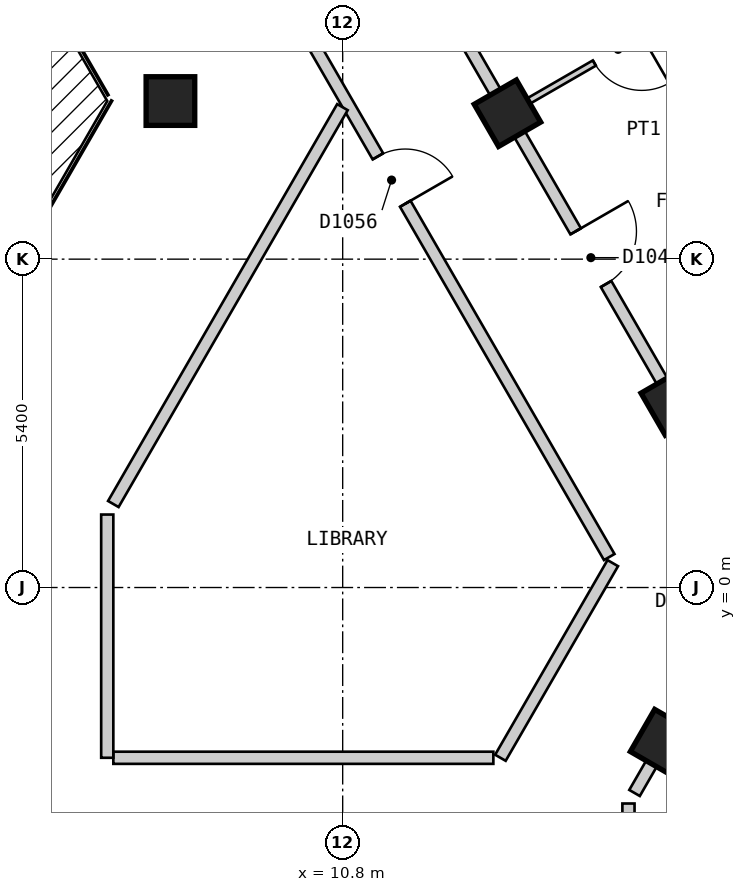
"""IFC4 building model, lengths in metres.
Left out: names, types, materials, properties, quantities, classifications, styles, units other than length and angle.
Written with IfcOpenShell. Run it as: python <this file> out.ifc"""

import sys

from ifc_helpers import new_model, si_unit, direction, frame, frame_2d, origin, origin_2d, place, context, subcontext, project, spatial, polyline, rectangle, outline, extrude, element, fill, save


model = new_model("IFC4")
c1 = context("Model", 3, precision=1e-05, world=origin(), true_north=direction((0.0, 1.0)))
c2 = subcontext(c1, "Body", "Model", "MODEL_VIEW")
j1 = project(units=[si_unit("LENGTHUNIT", "METRE"), si_unit("PLANEANGLEUNIT", "RADIAN")], contexts=[c1])
p1 = place(None, origin())
s1 = spatial("IfcSite", under=j1, at=p1, CompositionType="ELEMENT")
p2 = place(p1, origin())
s2 = spatial("IfcBuilding", under=s1, at=p2, CompositionType="ELEMENT")
p3 = place(p2, frame((0.0, 0.0, 126.6)))
s3 = spatial("IfcBuildingStorey", under=s2, at=p3, CompositionType="ELEMENT", Elevation=126.6)
for number, where, z_axis, x_axis in (
    (1, (16.078, -2.551, 0.0), (0.0, 0.0, 1.0), (0.5, 0.866, 0.0)),
    (2, (16.253, 3.05, 0.0), (0.0, 0.0, 1.0), (-0.5, 0.866, 0.0)),
    (3, (13.51, 7.8, 0.0), (0.0, 0.0, 1.0), (-0.5, 0.866, 0.0)),
    (4, (7.967, 8.0, 0.0), (0.0, 0.0, 1.0), (1.0, 0.0, 0.0)),
):
    element("IfcColumn", number, at=place(p3, frame(where, z_axis=z_axis, x_axis=x_axis)), inside=s3, PredefinedType="COLUMN", context=c2, shape_type="SweptSolid", body=[
        extrude(rectangle(XDim=0.8, YDim=0.8, at=origin_2d()), origin(), (0.0, 0.0, 1.0), 3.0),
    ])
p4 = place(p3, frame((15.862, -23.425, 0.0), z_axis=(0.0, 0.0, 1.0), x_axis=(0.500017503135, 0.866015298109, 0.0)))
e5 = element("IfcWall", 5, at=p4, inside=s3, PredefinedType="SOLIDWALL", context=c2, shape_type="SweptSolid", body=[
    extrude(outline(polyline([(0.0, -0.15), (24.711, -0.15), (24.631, 0.15), (0.08, 0.15), (0.0, -0.15)])), origin(), (0.0, 0.0, 1.0), 2.7),
])
p5 = place(p4, frame((1.4, 0.0, 0.15)))
e6 = element("IfcOpeningElement", 6, at=p5, cuts=e5, PredefinedType="OPENING", context=c2, shape_type="SweptSolid", body=[
    extrude(rectangle(XDim=1.5, YDim=2.1, at=frame_2d((0.75, 1.05))), frame((0.0, 0.16, 0.0), z_axis=(0.0, -1.0, 0.0), x_axis=(1.0, 0.0, 0.0)), (0.0, 0.0, 1.0), 0.32),
])
p6 = place(p4, frame((4.316, 0.0, 0.15)))
e7 = element("IfcOpeningElement", 7, at=p6, cuts=e5, PredefinedType="OPENING", context=c2, shape_type="SweptSolid", body=[
    extrude(rectangle(XDim=1.5, YDim=2.1, at=frame_2d((0.75, 1.05))), frame((0.0, 0.16, 0.0), z_axis=(0.0, -1.0, 0.0), x_axis=(1.0, 0.0, 0.0)), (0.0, 0.0, 1.0), 0.32),
])
p7 = place(p4, frame((7.231, 0.0, 0.15)))
e8 = element("IfcOpeningElement", 8, at=p7, cuts=e5, PredefinedType="OPENING", context=c2, shape_type="SweptSolid", body=[
    extrude(rectangle(XDim=1.5, YDim=2.1, at=frame_2d((0.75, 1.05))), frame((0.0, 0.16, 0.0), z_axis=(0.0, -1.0, 0.0), x_axis=(1.0, 0.0, 0.0)), (0.0, 0.0, 1.0), 0.32),
])
p8 = place(p4, frame((10.147, 0.0, 0.15)))
e9 = element("IfcOpeningElement", 9, at=p8, cuts=e5, PredefinedType="OPENING", context=c2, shape_type="SweptSolid", body=[
    extrude(rectangle(XDim=1.5, YDim=2.1, at=frame_2d((0.75, 1.05))), frame((0.0, 0.16, 0.0), z_axis=(0.0, -1.0, 0.0), x_axis=(1.0, 0.0, 0.0)), (0.0, 0.0, 1.0), 0.32),
])
p9 = place(p4, frame((13.062, 0.0, 0.15)))
e10 = element("IfcOpeningElement", 10, at=p9, cuts=e5, PredefinedType="OPENING", context=c2, shape_type="SweptSolid", body=[
    extrude(rectangle(XDim=1.5, YDim=2.1, at=frame_2d((0.75, 1.05))), frame((0.0, 0.16, 0.0), z_axis=(0.0, -1.0, 0.0), x_axis=(1.0, 0.0, 0.0)), (0.0, 0.0, 1.0), 0.32),
])
p10 = place(p4, frame((15.977, 0.0, 0.15)))
e11 = element("IfcOpeningElement", 11, at=p10, cuts=e5, PredefinedType="OPENING", context=c2, shape_type="SweptSolid", body=[
    extrude(rectangle(XDim=1.5, YDim=2.1, at=frame_2d((0.75, 1.05))), frame((0.0, 0.16, 0.0), z_axis=(0.0, -1.0, 0.0), x_axis=(1.0, 0.0, 0.0)), (0.0, 0.0, 1.0), 0.32),
])
p11 = place(p4, frame((18.893, 0.0, 0.15)))
e12 = element("IfcOpeningElement", 12, at=p11, cuts=e5, PredefinedType="OPENING", context=c2, shape_type="SweptSolid", body=[
    extrude(rectangle(XDim=1.5, YDim=2.1, at=frame_2d((0.75, 1.05))), frame((0.0, 0.16, 0.0), z_axis=(0.0, -1.0, 0.0), x_axis=(1.0, 0.0, 0.0)), (0.0, 0.0, 1.0), 0.32),
])
p12 = place(p4, frame((21.809, 0.0, 0.15)))
e13 = element("IfcOpeningElement", 13, at=p12, cuts=e5, PredefinedType="OPENING", context=c2, shape_type="SweptSolid", body=[
    extrude(rectangle(XDim=1.5, YDim=2.1, at=frame_2d((0.75, 1.05))), frame((0.0, 0.16, 0.0), z_axis=(0.0, -1.0, 0.0), x_axis=(1.0, 0.0, 0.0)), (0.0, 0.0, 1.0), 0.32),
])
p13 = place(p3, frame((7.967, 13.0, 0.0), z_axis=(0.0, 0.0, 1.0), x_axis=(0.50003774998, -0.866003607726, 0.0)))
e14 = element("IfcWall", 14, at=p13, inside=s3, PredefinedType="PARTITIONING", context=c2, shape_type="SweptSolid", body=[
    extrude(rectangle(XDim=14.433, YDim=0.2, at=frame_2d((7.217, 0.0))), origin(), (0.0, 0.0, 1.0), 2.7),
])
p14 = place(p13, frame((6.824, 0.0, 0.0)))
e15 = element("IfcOpeningElement", 15, at=p14, cuts=e14, PredefinedType="OPENING", context=c2, shape_type="SweptSolid", body=[
    extrude(rectangle(XDim=0.9, YDim=2.1, at=frame_2d((0.45, 1.05))), frame((0.0, 0.11, 0.0), z_axis=(0.0, -1.0, 0.0), x_axis=(1.0, 0.0, 0.0)), (0.0, 0.0, 1.0), 0.22),
])
p15 = place(p3, frame((9.296, 15.1, 0.0), z_axis=(0.0, 0.0, 1.0), x_axis=(0.499974024244, -0.866040400375, 0.0)))
e16 = element("IfcWall", 16, at=p15, inside=s3, PredefinedType="PARTITIONING", context=c2, shape_type="SweptSolid", body=[
    extrude(rectangle(XDim=16.857, YDim=0.2, at=frame_2d((8.429, 0.0))), origin(), (0.0, 0.0, 1.0), 2.7),
])
p16 = place(p15, frame((10.672, 0.0, 0.0)))
e17 = element("IfcOpeningElement", 17, at=p16, cuts=e16, PredefinedType="OPENING", context=c2, shape_type="SweptSolid", body=[
    extrude(rectangle(XDim=1.0, YDim=2.1, at=frame_2d((0.5, 1.05))), frame((0.0, 0.11, 0.0), z_axis=(0.0, -1.0, 0.0), x_axis=(1.0, 0.0, 0.0)), (0.0, 0.0, 1.0), 0.22),
])
p17 = place(p3, frame((7.028, -2.8, 0.0), z_axis=(0.0, 0.0, 1.0), x_axis=(1.0, 0.0, 0.0)))
e18 = element("IfcWall", 18, at=p17, inside=s3, PredefinedType="PARTITIONING", context=c2, shape_type="SweptSolid", body=[
    extrude(rectangle(XDim=6.25, YDim=0.2, at=frame_2d((3.125, 0.0))), origin(), (0.0, 0.0, 1.0), 2.7),
])
p18 = place(p3, frame((7.028, 1.373, 0.0), z_axis=(0.0, 0.0, 1.0), x_axis=(0.499954271211, 0.866051803703, 0.0)))
e19 = element("IfcWall", 19, at=p18, inside=s3, PredefinedType="PARTITIONING", context=c2, shape_type="SweptSolid", body=[
    extrude(rectangle(XDim=7.536, YDim=0.2, at=frame_2d((3.768, 0.0))), origin(), (0.0, 0.0, 1.0), 2.7),
])
p19 = place(p3, frame((13.394, -2.8, 0.0), z_axis=(0.0, 0.0, 1.0), x_axis=(0.499968324138, 0.866043691079, 0.0)))
e20 = element("IfcWall", 20, at=p19, inside=s3, PredefinedType="PARTITIONING", context=c2, shape_type="SweptSolid", body=[
    extrude(rectangle(XDim=3.696, YDim=0.2, at=frame_2d((1.848, 0.0))), origin(), (0.0, 0.0, 1.0), 2.7),
])
p20 = place(p3, frame((15.6, -3.379, 0.0), z_axis=(0.0, 0.0, 1.0), x_axis=(0.499896543382, 0.866085126252, 0.0)))
e21 = element("IfcWall", 21, at=p20, inside=s3, PredefinedType="PARTITIONING", context=c2, shape_type="SweptSolid", body=[
    extrude(rectangle(XDim=4.249, YDim=0.2, at=frame_2d((2.125, 0.0))), origin(), (0.0, 0.0, 1.0), 2.7),
])
p21 = place(p20, frame((3.232, 0.0, 0.0)))
e22 = element("IfcOpeningElement", 22, at=p21, cuts=e21, PredefinedType="OPENING", context=c2, shape_type="SweptSolid", body=[
    extrude(rectangle(XDim=0.8, YDim=2.1, at=frame_2d((0.4, 1.05))), frame((0.0, 0.11, 0.0), z_axis=(0.0, -1.0, 0.0), x_axis=(1.0, 0.0, 0.0)), (0.0, 0.0, 1.0), 0.22),
])
p22 = place(p3, frame((6.928, -2.8, 0.0), z_axis=(0.0, 0.0, 1.0), x_axis=(0.0, 1.0, 0.0)))
e23 = element("IfcWall", 23, at=p22, inside=s3, PredefinedType="PARTITIONING", context=c2, shape_type="SweptSolid", body=[
    extrude(rectangle(XDim=4.0, YDim=0.2, at=frame_2d((2.0, 0.0))), origin(), (0.0, 0.0, 1.0), 2.7),
])
p23 = place(p3, frame((15.5, -21.2, 0.0), z_axis=(0.0, 0.0, 1.0), x_axis=(0.0, 1.0, 0.0)))
e24 = element("IfcWall", 24, at=p23, inside=s3, PredefinedType="PARTITIONING", context=c2, shape_type="SweptSolid", body=[
    extrude(rectangle(XDim=17.648, YDim=0.2, at=frame_2d((8.824, 0.0))), origin(), (0.0, 0.0, 1.0), 2.7),
])
p24 = place(p23, frame((7.575, 0.0, 0.0)))
e25 = element("IfcOpeningElement", 25, at=p24, cuts=e24, PredefinedType="OPENING", context=c2, shape_type="SweptSolid", body=[
    extrude(rectangle(XDim=1.0, YDim=2.1, at=frame_2d((0.5, 1.05))), frame((0.0, 0.11, 0.0), z_axis=(0.0, -1.0, 0.0), x_axis=(1.0, 0.0, 0.0)), (0.0, 0.0, 1.0), 0.22),
])
p25 = place(p3, frame((14.455, 14.563, 0.0), z_axis=(0.0, 0.0, 1.0), x_axis=(0.500009803579, -0.866019743612, 0.0)))
e26 = element("IfcWall", 26, at=p25, inside=s3, PredefinedType="PARTITIONING", context=c2, shape_type="SweptSolid", body=[
    extrude(rectangle(XDim=16.254, YDim=0.1, at=frame_2d((8.127, 0.0))), origin(), (0.0, 0.0, 1.0), 2.7),
])
p26 = place(p25, frame((7.677, 0.0, 0.0)))
e27 = element("IfcOpeningElement", 27, at=p26, cuts=e26, PredefinedType="OPENING", context=c2, shape_type="SweptSolid", body=[
    extrude(rectangle(XDim=0.9, YDim=2.1, at=frame_2d((0.45, 1.05))), frame((0.0, 0.06, 0.0), z_axis=(0.0, -1.0, 0.0), x_axis=(1.0, 0.0, 0.0)), (0.0, 0.0, 1.0), 0.12),
])
p27 = place(p3, frame((13.597, 7.85, 0.0), z_axis=(0.0, 0.0, 1.0), x_axis=(0.866006068523, 0.500033488159, 0.0)))
e28 = element("IfcWall", 28, at=p27, inside=s3, PredefinedType="PARTITIONING", context=c2, shape_type="SweptSolid", body=[
    extrude(rectangle(XDim=4.099, YDim=0.1, at=frame_2d((2.05, 0.0))), origin(), (0.0, 0.0, 1.0), 2.7),
])
p28 = place(p27, frame((1.55, 0.0, 0.0)))
e29 = element("IfcOpeningElement", 29, at=p28, cuts=e28, PredefinedType="OPENING", context=c2, shape_type="SweptSolid", body=[
    extrude(rectangle(XDim=0.9, YDim=2.1, at=frame_2d((0.45, 1.05))), frame((0.0, 0.06, 0.0), z_axis=(0.0, -1.0, 0.0), x_axis=(1.0, 0.0, 0.0)), (0.0, 0.0, 1.0), 0.12),
])
p29 = place(p16, origin())
e30 = element("IfcDoor", 30, at=p29, inside=s3, OperationType="SINGLE_SWING_LEFT", PredefinedType="DOOR", context=c2, shape_type="SweptSolid", body=[
    extrude(rectangle(XDim=1.0, YDim=2.1, at=frame_2d((0.5, 1.05))), frame((0.0, 0.025, 0.0), z_axis=(0.0, -1.0, 0.0), x_axis=(1.0, 0.0, 0.0)), (0.0, 0.0, 1.0), 0.05),
])
fill(e17, e30)
p30 = place(p28, origin())
e31 = element("IfcDoor", 31, at=p30, inside=s3, OperationType="SINGLE_SWING_RIGHT", PredefinedType="DOOR", context=c2, shape_type="SweptSolid", body=[
    extrude(rectangle(XDim=0.9, YDim=2.1, at=frame_2d((0.45, 1.05))), frame((0.0, 0.025, 0.0), z_axis=(0.0, -1.0, 0.0), x_axis=(1.0, 0.0, 0.0)), (0.0, 0.0, 1.0), 0.05),
])
fill(e29, e31)
p31 = place(p14, origin())
e32 = element("IfcDoor", 32, at=p31, inside=s3, OperationType="SINGLE_SWING_RIGHT", PredefinedType="DOOR", context=c2, shape_type="SweptSolid", body=[
    extrude(rectangle(XDim=0.9, YDim=2.1, at=frame_2d((0.45, 1.05))), frame((0.0, 0.025, 0.0), z_axis=(0.0, -1.0, 0.0), x_axis=(1.0, 0.0, 0.0)), (0.0, 0.0, 1.0), 0.05),
])
fill(e15, e32)
save(model, sys.argv[1])
